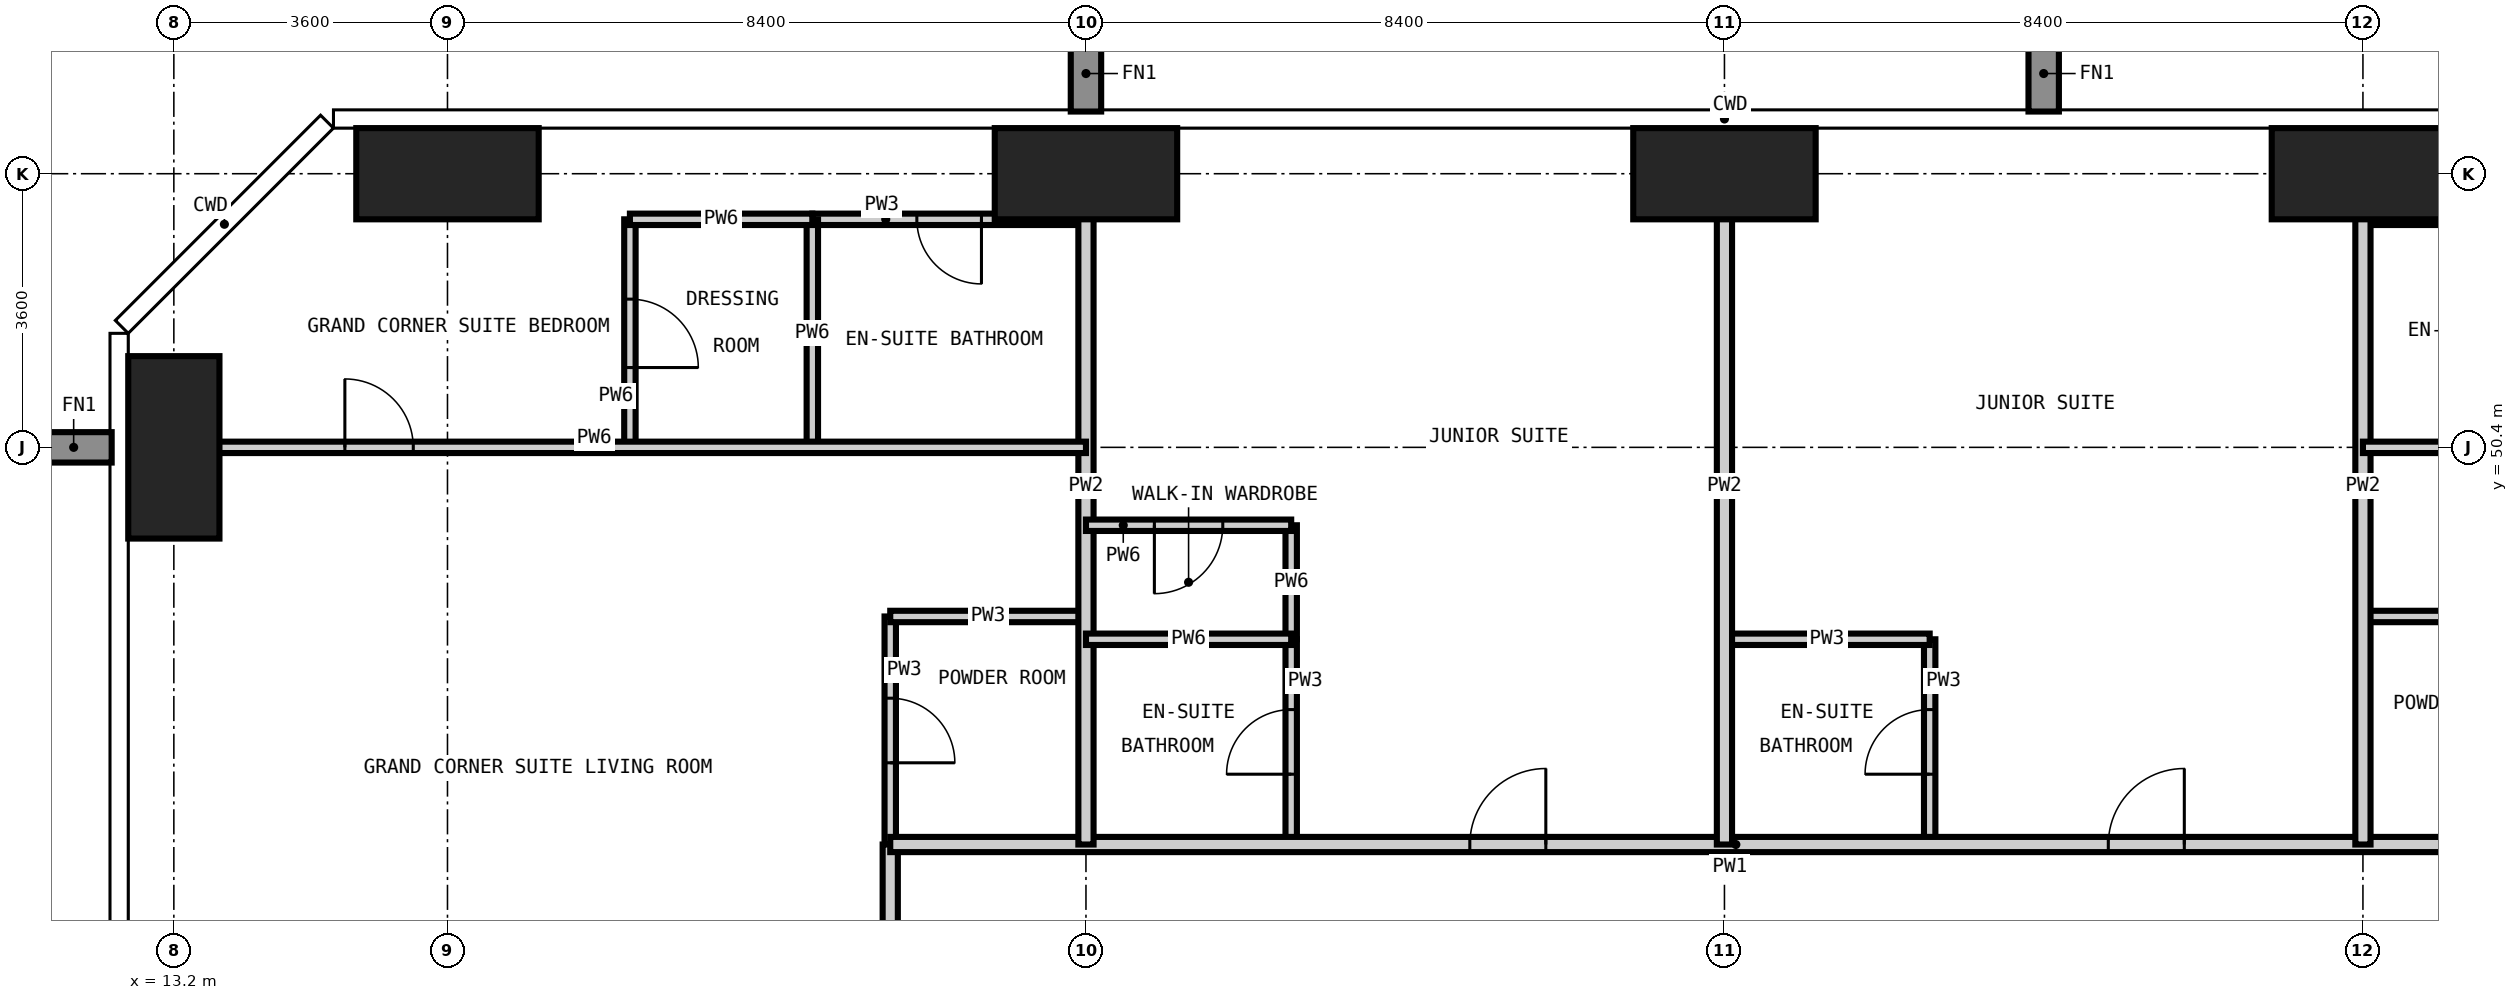
"""IFC4 building model, lengths in metres.
Left out: names, types, materials, properties, quantities, classifications, styles, units other than length and angle.
Written with IfcOpenShell. Run it as: python <this file> out.ifc"""

import sys

from ifc_helpers import new_model, si_unit, direction, frame, frame_2d, origin, origin_2d, place, context, subcontext, project, spatial, rectangle, extrude, element, fill, save


model = new_model("IFC4")
c1 = context("Model", 3, precision=1e-05, world=origin(), true_north=direction((0.0, 1.0)))
c2 = subcontext(c1, "Body", "Model", "MODEL_VIEW")
j1 = project(units=[si_unit("LENGTHUNIT", "METRE"), si_unit("PLANEANGLEUNIT", "RADIAN")], contexts=[c1])
p1 = place(None, origin())
s1 = spatial("IfcSite", under=j1, at=p1, CompositionType="ELEMENT")
p2 = place(p1, origin())
s2 = spatial("IfcBuilding", under=s1, at=p2, CompositionType="ELEMENT")
p3 = place(p2, frame((0.0, 0.0, 233.4)))
s3 = spatial("IfcBuildingStorey", under=s2, at=p3, CompositionType="ELEMENT", Elevation=233.4)
p4 = place(p3, frame((13.2, 50.4, -0.35), z_axis=(0.0, 0.0, 1.0), x_axis=(1.0, 0.0, 0.0)))
e1 = element("IfcColumn", 1, at=p4, inside=s3, PredefinedType="COLUMN", context=c2, shape_type="SweptSolid", body=[
    extrude(rectangle(XDim=1.2, YDim=2.4, at=origin_2d()), origin(), (0.0, 0.0, 1.0), 3.9),
])
for number, where, z_axis, x_axis in (
    (2, (16.8, 54.0, -0.35), (0.0, 0.0, 1.0), (1.0, 0.0, 0.0)),
    (3, (25.2, 54.0, -0.35), (0.0, 0.0, 1.0), (1.0, 0.0, 0.0)),
    (4, (33.6, 54.0, -0.35), (0.0, 0.0, 1.0), (1.0, 0.0, 0.0)),
    (5, (42.0, 54.0, -0.35), (0.0, 0.0, 1.0), (1.0, 0.0, 0.0)),
):
    element("IfcColumn", number, at=place(p3, frame(where, z_axis=z_axis, x_axis=x_axis)), inside=s3, PredefinedType="COLUMN", context=c2, shape_type="SweptSolid", body=[
        extrude(rectangle(XDim=2.4, YDim=1.2, at=origin_2d()), origin(), (0.0, 0.0, 1.0), 3.9),
    ])
p5 = place(p3, frame((22.625, 45.175, 0.0), z_axis=(0.0, 0.0, 1.0), x_axis=(0.0, 1.0, 0.0)))
e6 = element("IfcWall", 6, at=p5, inside=s3, PredefinedType="PARTITIONING", context=c2, shape_type="SweptSolid", body=[
    extrude(rectangle(XDim=3.0, YDim=0.15, at=frame_2d((1.5, 0.0))), origin(), (0.0, 0.0, 1.0), 3.55),
])
p6 = place(p5, frame((1.075, 0.0, 0.0)))
e7 = element("IfcOpeningElement", 7, at=p6, cuts=e6, PredefinedType="OPENING", context=c2, shape_type="SweptSolid", body=[
    extrude(rectangle(XDim=0.85, YDim=2.1, at=frame_2d((0.425, 1.05))), frame((0.0, 0.085, 0.0), z_axis=(0.0, -1.0, 0.0), x_axis=(1.0, 0.0, 0.0)), (0.0, 0.0, 1.0), 0.17),
])
p7 = place(p3, frame((27.9, 45.175, 0.0), z_axis=(0.0, 0.0, 1.0), x_axis=(0.0, 1.0, 0.0)))
e8 = element("IfcWall", 8, at=p7, inside=s3, PredefinedType="PARTITIONING", context=c2, shape_type="SweptSolid", body=[
    extrude(rectangle(XDim=2.7, YDim=0.15, at=frame_2d((1.35, 0.0))), origin(), (0.0, 0.0, 1.0), 3.55),
])
p8 = place(p7, frame((0.925, 0.0, 0.0)))
e9 = element("IfcOpeningElement", 9, at=p8, cuts=e8, PredefinedType="OPENING", context=c2, shape_type="SweptSolid", body=[
    extrude(rectangle(XDim=0.85, YDim=2.1, at=frame_2d((0.425, 1.05))), frame((0.0, 0.085, 0.0), z_axis=(0.0, -1.0, 0.0), x_axis=(1.0, 0.0, 0.0)), (0.0, 0.0, 1.0), 0.17),
])
p9 = place(p3, frame((36.3, 45.175, 0.0), z_axis=(0.0, 0.0, 1.0), x_axis=(0.0, 1.0, 0.0)))
e10 = element("IfcWall", 10, at=p9, inside=s3, PredefinedType="PARTITIONING", context=c2, shape_type="SweptSolid", body=[
    extrude(rectangle(XDim=2.7, YDim=0.15, at=frame_2d((1.35, 0.0))), origin(), (0.0, 0.0, 1.0), 3.55),
])
p10 = place(p9, frame((0.925, 0.0, 0.0)))
e11 = element("IfcOpeningElement", 11, at=p10, cuts=e10, PredefinedType="OPENING", context=c2, shape_type="SweptSolid", body=[
    extrude(rectangle(XDim=0.85, YDim=2.1, at=frame_2d((0.425, 1.05))), frame((0.0, 0.085, 0.0), z_axis=(0.0, -1.0, 0.0), x_axis=(1.0, 0.0, 0.0)), (0.0, 0.0, 1.0), 0.17),
])
p11 = place(p3, frame((33.6, 47.875, 0.0), z_axis=(0.0, 0.0, 1.0), x_axis=(1.0, 0.0, 0.0)))
e12 = element("IfcWall", 12, at=p11, inside=s3, PredefinedType="PARTITIONING", context=c2, shape_type="SweptSolid", body=[
    extrude(rectangle(XDim=2.7, YDim=0.15, at=frame_2d((1.35, 0.0))), origin(), (0.0, 0.0, 1.0), 3.55),
])
p12 = place(p3, frame((22.625, 48.175, 0.0), z_axis=(0.0, 0.0, 1.0), x_axis=(1.0, 0.0, 0.0)))
e13 = element("IfcWall", 13, at=p12, inside=s3, PredefinedType="PARTITIONING", context=c2, shape_type="SweptSolid", body=[
    extrude(rectangle(XDim=2.575, YDim=0.15, at=frame_2d((1.288, 0.0))), origin(), (0.0, 0.0, 1.0), 3.55),
])
p13 = place(p3, frame((42.0, 48.175, 0.0), z_axis=(0.0, 0.0, 1.0), x_axis=(1.0, 0.0, 0.0)))
e14 = element("IfcWall", 14, at=p13, inside=s3, PredefinedType="PARTITIONING", context=c2, shape_type="SweptSolid", body=[
    extrude(rectangle(XDim=2.875, YDim=0.15, at=frame_2d((1.438, 0.0))), origin(), (0.0, 0.0, 1.0), 3.55),
])
p14 = place(p3, frame((21.6, 53.4, 0.0), z_axis=(0.0, 0.0, 1.0), x_axis=(1.0, 0.0, 0.0)))
e15 = element("IfcWall", 15, at=p14, inside=s3, PredefinedType="PARTITIONING", context=c2, shape_type="SweptSolid", body=[
    extrude(rectangle(XDim=3.6, YDim=0.15, at=frame_2d((1.8, 0.0))), origin(), (0.0, 0.0, 1.0), 3.55),
])
p15 = place(p14, frame((1.375, 0.0, 0.0)))
e16 = element("IfcOpeningElement", 16, at=p15, cuts=e15, PredefinedType="OPENING", context=c2, shape_type="SweptSolid", body=[
    extrude(rectangle(XDim=0.85, YDim=2.1, at=frame_2d((0.425, 1.05))), frame((0.0, 0.085, 0.0), z_axis=(0.0, -1.0, 0.0), x_axis=(1.0, 0.0, 0.0)), (0.0, 0.0, 1.0), 0.17),
])
p16 = place(p3, frame((42.0, 53.4, 0.0), z_axis=(0.0, 0.0, 1.0), x_axis=(1.0, 0.0, 0.0)))
e17 = element("IfcWall", 17, at=p16, inside=s3, PredefinedType="PARTITIONING", context=c2, shape_type="SweptSolid", body=[
    extrude(rectangle(XDim=3.6, YDim=0.15, at=frame_2d((1.8, 0.0))), origin(), (0.0, 0.0, 1.0), 3.55),
])
p17 = place(p16, frame((1.375, 0.0, 0.0)))
e18 = element("IfcOpeningElement", 18, at=p17, cuts=e17, PredefinedType="OPENING", context=c2, shape_type="SweptSolid", body=[
    extrude(rectangle(XDim=0.85, YDim=2.1, at=frame_2d((0.425, 1.05))), frame((0.0, 0.085, 0.0), z_axis=(0.0, -1.0, 0.0), x_axis=(1.0, 0.0, 0.0)), (0.0, 0.0, 1.0), 0.17),
])
p18 = place(p3, frame((22.625, 14.225, 0.0), z_axis=(0.0, 0.0, 1.0), x_axis=(0.0, 1.0, 0.0)))
e19 = element("IfcWall", 19, at=p18, inside=s3, PredefinedType="PARTITIONING", context=c2, shape_type="SweptSolid", body=[
    extrude(rectangle(XDim=30.95, YDim=0.2, at=frame_2d((15.475, 0.0))), origin(), (0.0, 0.0, 1.0), 3.55),
])
p19 = place(p18, frame((5.075, 0.0, 0.0)))
e20 = element("IfcOpeningElement", 20, at=p19, cuts=e19, PredefinedType="OPENING", context=c2, shape_type="SweptSolid", body=[
    extrude(rectangle(XDim=1.0, YDim=2.2, at=frame_2d((0.5, 1.1))), frame((0.0, 0.11, 0.0), z_axis=(0.0, -1.0, 0.0), x_axis=(1.0, 0.0, 0.0)), (0.0, 0.0, 1.0), 0.22),
])
p20 = place(p18, frame((13.475, 0.0, 0.0)))
e21 = element("IfcOpeningElement", 21, at=p20, cuts=e19, PredefinedType="OPENING", context=c2, shape_type="SweptSolid", body=[
    extrude(rectangle(XDim=1.0, YDim=2.2, at=frame_2d((0.5, 1.1))), frame((0.0, 0.11, 0.0), z_axis=(0.0, -1.0, 0.0), x_axis=(1.0, 0.0, 0.0)), (0.0, 0.0, 1.0), 0.22),
])
p21 = place(p18, frame((21.875, 0.0, 0.0)))
e22 = element("IfcOpeningElement", 22, at=p21, cuts=e19, PredefinedType="OPENING", context=c2, shape_type="SweptSolid", body=[
    extrude(rectangle(XDim=1.0, YDim=2.2, at=frame_2d((0.5, 1.1))), frame((0.0, 0.11, 0.0), z_axis=(0.0, -1.0, 0.0), x_axis=(1.0, 0.0, 0.0)), (0.0, 0.0, 1.0), 0.22),
])
p22 = place(p18, frame((0.787, 0.0, 0.0)))
e23 = element("IfcOpeningElement", 23, at=p22, cuts=e19, PredefinedType="OPENING", context=c2, shape_type="SweptSolid", body=[
    extrude(rectangle(XDim=1.0, YDim=2.2, at=frame_2d((0.5, 1.1))), frame((0.0, 0.11, 0.0), z_axis=(0.0, -1.0, 0.0), x_axis=(1.0, 0.0, 0.0)), (0.0, 0.0, 1.0), 0.22),
])
p23 = place(p18, frame((28.862, 0.0, 0.0)))
e24 = element("IfcOpeningElement", 24, at=p23, cuts=e19, PredefinedType="OPENING", context=c2, shape_type="SweptSolid", body=[
    extrude(rectangle(XDim=1.0, YDim=2.2, at=frame_2d((0.5, 1.1))), frame((0.0, 0.11, 0.0), z_axis=(0.0, -1.0, 0.0), x_axis=(1.0, 0.0, 0.0)), (0.0, 0.0, 1.0), 0.22),
])
p24 = place(p3, frame((22.625, 45.175, 0.0), z_axis=(0.0, 0.0, 1.0), x_axis=(1.0, 0.0, 0.0)))
e25 = element("IfcWall", 25, at=p24, inside=s3, PredefinedType="PARTITIONING", context=c2, shape_type="SweptSolid", body=[
    extrude(rectangle(XDim=22.25, YDim=0.2, at=frame_2d((11.125, 0.0))), origin(), (0.0, 0.0, 1.0), 3.55),
])
p25 = place(p24, frame((7.625, 0.0, 0.0)))
e26 = element("IfcOpeningElement", 26, at=p25, cuts=e25, PredefinedType="OPENING", context=c2, shape_type="SweptSolid", body=[
    extrude(rectangle(XDim=1.0, YDim=2.2, at=frame_2d((0.5, 1.1))), frame((0.0, 0.11, 0.0), z_axis=(0.0, -1.0, 0.0), x_axis=(1.0, 0.0, 0.0)), (0.0, 0.0, 1.0), 0.22),
])
p26 = place(p24, frame((16.025, 0.0, 0.0)))
e27 = element("IfcOpeningElement", 27, at=p26, cuts=e25, PredefinedType="OPENING", context=c2, shape_type="SweptSolid", body=[
    extrude(rectangle(XDim=1.0, YDim=2.2, at=frame_2d((0.5, 1.1))), frame((0.0, 0.11, 0.0), z_axis=(0.0, -1.0, 0.0), x_axis=(1.0, 0.0, 0.0)), (0.0, 0.0, 1.0), 0.22),
])
for number, where, z_axis, x_axis in (
    (28, (25.2, 45.175, 0.0), (0.0, 0.0, 1.0), (0.0, 1.0, 0.0)),
    (29, (33.6, 45.175, 0.0), (0.0, 0.0, 1.0), (0.0, 1.0, 0.0)),
    (30, (42.0, 45.175, 0.0), (0.0, 0.0, 1.0), (0.0, 1.0, 0.0)),
):
    element("IfcWall", number, at=place(p3, frame(where, z_axis=z_axis, x_axis=x_axis)), inside=s3, PredefinedType="PARTITIONING", context=c2, shape_type="SweptSolid", body=[
        extrude(rectangle(XDim=9.443, YDim=0.2, at=frame_2d((4.721, 0.0))), origin(), (0.0, 0.0, 1.0), 3.55),
    ])
p27 = place(p3, frame((19.2, 50.4, 0.0), z_axis=(0.0, 0.0, 1.0), x_axis=(0.0, 1.0, 0.0)))
e31 = element("IfcWall", 31, at=p27, inside=s3, PredefinedType="PARTITIONING", context=c2, shape_type="SweptSolid", body=[
    extrude(rectangle(XDim=3.0, YDim=0.15, at=frame_2d((1.5, 0.0))), origin(), (0.0, 0.0, 1.0), 3.55),
])
p28 = place(p27, frame((1.05, 0.0, 0.0)))
e32 = element("IfcOpeningElement", 32, at=p28, cuts=e31, PredefinedType="OPENING", context=c2, shape_type="SweptSolid", body=[
    extrude(rectangle(XDim=0.9, YDim=2.1, at=frame_2d((0.45, 1.05))), frame((0.0, 0.085, 0.0), z_axis=(0.0, -1.0, 0.0), x_axis=(1.0, 0.0, 0.0)), (0.0, 0.0, 1.0), 0.17),
])
p29 = place(p3, frame((21.6, 50.4, 0.0), z_axis=(0.0, 0.0, 1.0), x_axis=(0.0, 1.0, 0.0)))
e33 = element("IfcWall", 33, at=p29, inside=s3, PredefinedType="PARTITIONING", context=c2, shape_type="SweptSolid", body=[
    extrude(rectangle(XDim=3.0, YDim=0.15, at=frame_2d((1.5, 0.0))), origin(), (0.0, 0.0, 1.0), 3.55),
])
p30 = place(p3, frame((27.9, 47.875, 0.0), z_axis=(0.0, 0.0, 1.0), x_axis=(0.0, 1.0, 0.0)))
e34 = element("IfcWall", 34, at=p30, inside=s3, PredefinedType="PARTITIONING", context=c2, shape_type="SweptSolid", body=[
    extrude(rectangle(XDim=1.5, YDim=0.15, at=frame_2d((0.75, 0.0))), origin(), (0.0, 0.0, 1.0), 3.55),
])
p31 = place(p3, frame((25.2, 47.875, 0.0), z_axis=(0.0, 0.0, 1.0), x_axis=(1.0, 0.0, 0.0)))
e35 = element("IfcWall", 35, at=p31, inside=s3, PredefinedType="PARTITIONING", context=c2, shape_type="SweptSolid", body=[
    extrude(rectangle(XDim=2.7, YDim=0.15, at=frame_2d((1.35, 0.0))), origin(), (0.0, 0.0, 1.0), 3.55),
])
p32 = place(p3, frame((25.2, 49.375, 0.0), z_axis=(0.0, 0.0, 1.0), x_axis=(1.0, 0.0, 0.0)))
e36 = element("IfcWall", 36, at=p32, inside=s3, PredefinedType="PARTITIONING", context=c2, shape_type="SweptSolid", body=[
    extrude(rectangle(XDim=2.7, YDim=0.15, at=frame_2d((1.35, 0.0))), origin(), (0.0, 0.0, 1.0), 3.55),
])
p33 = place(p32, frame((0.9, 0.0, 0.0)))
e37 = element("IfcOpeningElement", 37, at=p33, cuts=e36, PredefinedType="OPENING", context=c2, shape_type="SweptSolid", body=[
    extrude(rectangle(XDim=0.9, YDim=2.1, at=frame_2d((0.45, 1.05))), frame((0.0, 0.085, 0.0), z_axis=(0.0, -1.0, 0.0), x_axis=(1.0, 0.0, 0.0)), (0.0, 0.0, 1.0), 0.17),
])
p34 = place(p3, frame((12.582, 50.4, 0.0), z_axis=(0.0, 0.0, 1.0), x_axis=(1.0, 0.0, 0.0)))
e38 = element("IfcWall", 38, at=p34, inside=s3, PredefinedType="PARTITIONING", context=c2, shape_type="SweptSolid", body=[
    extrude(rectangle(XDim=12.618, YDim=0.15, at=frame_2d((6.309, 0.0))), origin(), (0.0, 0.0, 1.0), 3.55),
])
p35 = place(p34, frame((2.868, 0.0, 0.0)))
e39 = element("IfcOpeningElement", 39, at=p35, cuts=e38, PredefinedType="OPENING", context=c2, shape_type="SweptSolid", body=[
    extrude(rectangle(XDim=0.9, YDim=2.1, at=frame_2d((0.45, 1.05))), frame((0.0, 0.085, 0.0), z_axis=(0.0, -1.0, 0.0), x_axis=(1.0, 0.0, 0.0)), (0.0, 0.0, 1.0), 0.17),
])
p36 = place(p3, frame((42.0, 50.4, 0.0), z_axis=(0.0, 0.0, 1.0), x_axis=(1.0, 0.0, 0.0)))
e40 = element("IfcWall", 40, at=p36, inside=s3, PredefinedType="PARTITIONING", context=c2, shape_type="SweptSolid", body=[
    extrude(rectangle(XDim=12.618, YDim=0.15, at=frame_2d((6.309, 0.0))), origin(), (0.0, 0.0, 1.0), 3.55),
])
p37 = place(p36, frame((8.85, 0.0, 0.0)))
e41 = element("IfcOpeningElement", 41, at=p37, cuts=e40, PredefinedType="OPENING", context=c2, shape_type="SweptSolid", body=[
    extrude(rectangle(XDim=0.9, YDim=2.1, at=frame_2d((0.45, 1.05))), frame((0.0, 0.085, 0.0), z_axis=(0.0, -1.0, 0.0), x_axis=(1.0, 0.0, 0.0)), (0.0, 0.0, 1.0), 0.17),
])
p38 = place(p3, frame((19.2, 53.4, 0.0), z_axis=(0.0, 0.0, 1.0), x_axis=(1.0, 0.0, 0.0)))
e42 = element("IfcWall", 42, at=p38, inside=s3, PredefinedType="PARTITIONING", context=c2, shape_type="SweptSolid", body=[
    extrude(rectangle(XDim=2.4, YDim=0.15, at=frame_2d((1.2, 0.0))), origin(), (0.0, 0.0, 1.0), 3.55),
])
p39 = place(p25, origin())
e43 = element("IfcDoor", 43, at=p39, inside=s3, OperationType="SINGLE_SWING_RIGHT", PredefinedType="DOOR", context=c2, shape_type="SweptSolid", body=[
    extrude(rectangle(XDim=1.0, YDim=2.2, at=frame_2d((0.5, 1.1))), frame((0.0, 0.025, 0.0), z_axis=(0.0, -1.0, 0.0), x_axis=(1.0, 0.0, 0.0)), (0.0, 0.0, 1.0), 0.05),
])
fill(e26, e43)
p40 = place(p8, origin())
e44 = element("IfcDoor", 44, at=p40, inside=s3, OperationType="SINGLE_SWING_LEFT", PredefinedType="DOOR", context=c2, shape_type="SweptSolid", body=[
    extrude(rectangle(XDim=0.85, YDim=2.1, at=frame_2d((0.425, 1.05))), frame((0.0, 0.025, 0.0), z_axis=(0.0, -1.0, 0.0), x_axis=(1.0, 0.0, 0.0)), (0.0, 0.0, 1.0), 0.05),
])
fill(e9, e44)
p41 = place(p33, frame((0.9, 0.0, 0.0), z_axis=(0.0, 0.0, 1.0), x_axis=(-1.0, 0.0, 0.0)))
e45 = element("IfcDoor", 45, at=p41, inside=s3, OperationType="SINGLE_SWING_RIGHT", PredefinedType="DOOR", context=c2, shape_type="SweptSolid", body=[
    extrude(rectangle(XDim=0.9, YDim=2.1, at=frame_2d((0.45, 1.05))), frame((0.0, 0.025, 0.0), z_axis=(0.0, -1.0, 0.0), x_axis=(1.0, 0.0, 0.0)), (0.0, 0.0, 1.0), 0.05),
])
fill(e37, e45)
p42 = place(p26, origin())
e46 = element("IfcDoor", 46, at=p42, inside=s3, OperationType="SINGLE_SWING_RIGHT", PredefinedType="DOOR", context=c2, shape_type="SweptSolid", body=[
    extrude(rectangle(XDim=1.0, YDim=2.2, at=frame_2d((0.5, 1.1))), frame((0.0, 0.025, 0.0), z_axis=(0.0, -1.0, 0.0), x_axis=(1.0, 0.0, 0.0)), (0.0, 0.0, 1.0), 0.05),
])
fill(e27, e46)
p43 = place(p10, origin())
e47 = element("IfcDoor", 47, at=p43, inside=s3, OperationType="SINGLE_SWING_LEFT", PredefinedType="DOOR", context=c2, shape_type="SweptSolid", body=[
    extrude(rectangle(XDim=0.85, YDim=2.1, at=frame_2d((0.425, 1.05))), frame((0.0, 0.025, 0.0), z_axis=(0.0, -1.0, 0.0), x_axis=(1.0, 0.0, 0.0)), (0.0, 0.0, 1.0), 0.05),
])
fill(e11, e47)
p44 = place(p6, frame((0.85, 0.0, 0.0), z_axis=(0.0, 0.0, 1.0), x_axis=(-1.0, 0.0, 0.0)))
e48 = element("IfcDoor", 48, at=p44, inside=s3, OperationType="SINGLE_SWING_RIGHT", PredefinedType="DOOR", context=c2, shape_type="SweptSolid", body=[
    extrude(rectangle(XDim=0.85, YDim=2.1, at=frame_2d((0.425, 1.05))), frame((0.0, 0.025, 0.0), z_axis=(0.0, -1.0, 0.0), x_axis=(1.0, 0.0, 0.0)), (0.0, 0.0, 1.0), 0.05),
])
fill(e7, e48)
p45 = place(p35, origin())
e49 = element("IfcDoor", 49, at=p45, inside=s3, OperationType="SINGLE_SWING_LEFT", PredefinedType="DOOR", context=c2, shape_type="SweptSolid", body=[
    extrude(rectangle(XDim=0.9, YDim=2.1, at=frame_2d((0.45, 1.05))), frame((0.0, 0.025, 0.0), z_axis=(0.0, -1.0, 0.0), x_axis=(1.0, 0.0, 0.0)), (0.0, 0.0, 1.0), 0.05),
])
fill(e39, e49)
p46 = place(p15, frame((0.85, 0.0, 0.0), z_axis=(0.0, 0.0, 1.0), x_axis=(-1.0, 0.0, 0.0)))
e50 = element("IfcDoor", 50, at=p46, inside=s3, OperationType="SINGLE_SWING_LEFT", PredefinedType="DOOR", context=c2, shape_type="SweptSolid", body=[
    extrude(rectangle(XDim=0.85, YDim=2.1, at=frame_2d((0.425, 1.05))), frame((0.0, 0.025, 0.0), z_axis=(0.0, -1.0, 0.0), x_axis=(1.0, 0.0, 0.0)), (0.0, 0.0, 1.0), 0.05),
])
fill(e16, e50)
p47 = place(p28, frame((0.9, 0.0, 0.0), z_axis=(0.0, 0.0, 1.0), x_axis=(-1.0, 0.0, 0.0)))
e51 = element("IfcDoor", 51, at=p47, inside=s3, OperationType="SINGLE_SWING_RIGHT", PredefinedType="DOOR", context=c2, shape_type="SweptSolid", body=[
    extrude(rectangle(XDim=0.9, YDim=2.1, at=frame_2d((0.45, 1.05))), frame((0.0, 0.025, 0.0), z_axis=(0.0, -1.0, 0.0), x_axis=(1.0, 0.0, 0.0)), (0.0, 0.0, 1.0), 0.05),
])
fill(e32, e51)
save(model, sys.argv[1])
